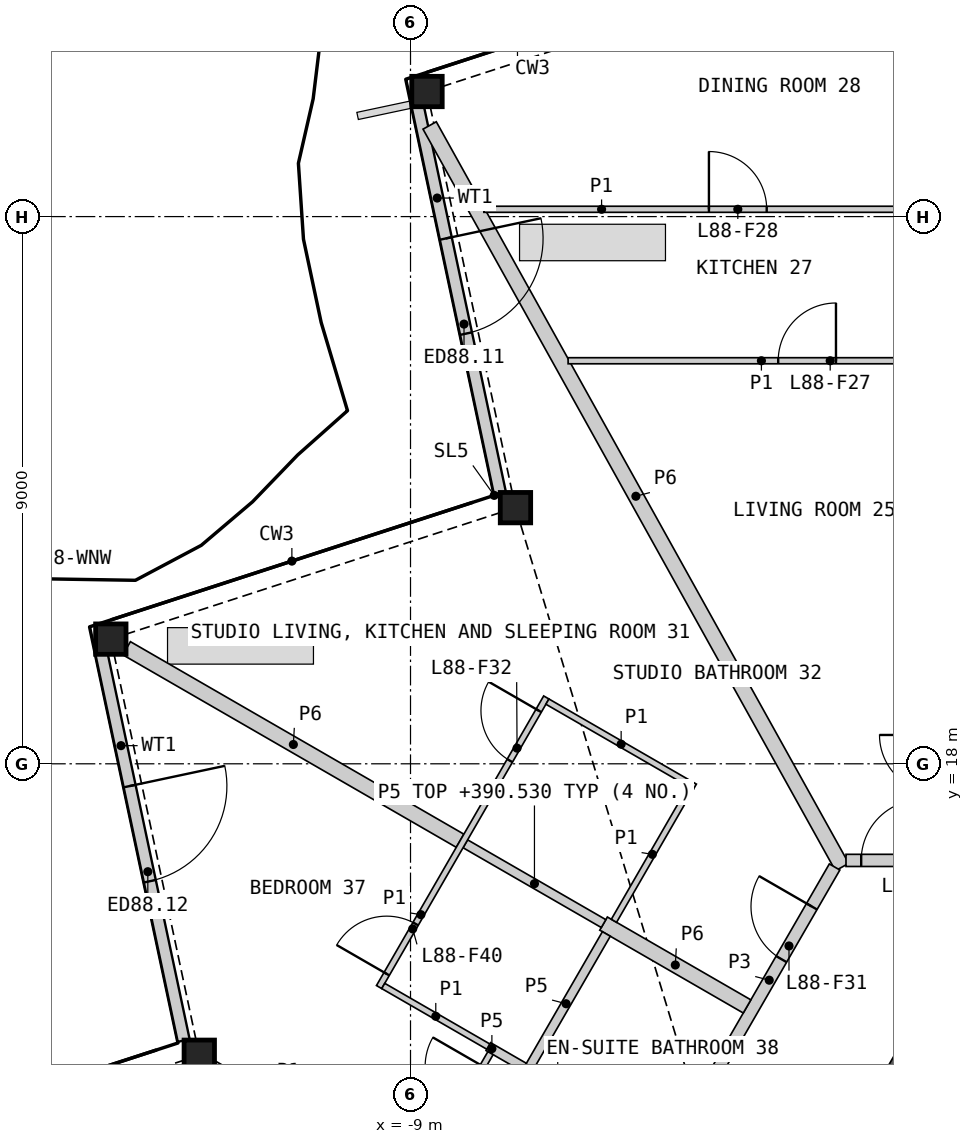
"""IFC4 building model, lengths in metres.
Left out: names, types, materials, properties, quantities, classifications, styles, units other than length and angle.
Written with IfcOpenShell. Run it as: python <this file> out.ifc"""

import sys

from ifc_helpers import new_model, si_unit, direction, frame, frame_2d, origin, origin_2d, place, context, subcontext, project, spatial, rectangle, hollow_rectangle, extrude, element, fill, save


model = new_model("IFC4")
c1 = context("Model", 3, precision=1e-05, world=origin(), true_north=direction((0.0, 1.0)))
c2 = subcontext(c1, "Body", "Model", "MODEL_VIEW")
j1 = project(units=[si_unit("LENGTHUNIT", "METRE"), si_unit("PLANEANGLEUNIT", "RADIAN")], contexts=[c1])
p1 = place(None, origin())
s1 = spatial("IfcSite", under=j1, at=p1, CompositionType="ELEMENT")
p2 = place(p1, origin())
s2 = spatial("IfcBuilding", under=s1, at=p2, CompositionType="ELEMENT")
p3 = place(p2, frame((0.0, 0.0, 388.2)))
s3 = spatial("IfcBuildingStorey", under=s2, at=p3, CompositionType="ELEMENT", Elevation=388.2)
for number, where, z_axis, x_axis in (
    (1, (-8.729, 29.057, 0.0), (0.0, 0.0, 1.0), (1.0, 0.0, 0.0)),
    (2, (-7.274, 22.213, 0.0), (0.0, 0.0, 1.0), (1.0, 0.0, 0.0)),
    (3, (-13.929, 20.051, 0.0), (0.0, 0.0, 1.0), (1.0, 0.0, 0.0)),
    (4, (-12.474, 13.206, 0.0), (0.0, 0.0, 1.0), (1.0, 0.0, 0.0)),
):
    element("IfcColumn", number, at=place(p3, frame(where, z_axis=z_axis, x_axis=x_axis)), inside=s3, PredefinedType="COLUMN", context=c2, shape_type="SweptSolid", body=[
        extrude(hollow_rectangle(XDim=0.5, YDim=0.5, WallThickness=0.03, at=origin_2d()), origin(), (0.0, 0.0, 1.0), 3.4),
    ])
p4 = place(p3, frame((-8.905, 28.922, 0.0), z_axis=(0.0, 0.0, 1.0), x_axis=(0.207917488951, -0.978146368285, 0.0)))
e5 = element("IfcWall", 5, at=p4, inside=s3, PredefinedType="SOLIDWALL", context=c2, shape_type="SweptSolid", body=[
    extrude(rectangle(XDim=6.612, YDim=0.2, at=frame_2d((3.306, 0.0))), origin(), (0.0, 0.0, 1.0), 2.634),
])
p5 = place(p4, frame((2.333, 0.0, 0.0)))
e6 = element("IfcOpeningElement", 6, at=p5, cuts=e5, PredefinedType="OPENING", context=c2, shape_type="SweptSolid", body=[
    extrude(rectangle(XDim=1.6, YDim=2.25, at=frame_2d((0.8, 1.125))), frame((0.0, 0.11, 0.0), z_axis=(0.0, -1.0, 0.0), x_axis=(1.0, 0.0, 0.0)), (0.0, 0.0, 1.0), 0.22),
])
p6 = place(p3, frame((-14.104, 19.915, 0.0), z_axis=(0.0, 0.0, 1.0), x_axis=(0.207924998532, -0.978144771997, 0.0)))
e7 = element("IfcWall", 7, at=p6, inside=s3, PredefinedType="SOLIDWALL", context=c2, shape_type="SweptSolid", body=[
    extrude(rectangle(XDim=6.612, YDim=0.2, at=frame_2d((3.306, 0.0))), origin(), (0.0, 0.0, 1.0), 2.634),
])
p7 = place(p6, frame((2.333, 0.0, 0.0)))
e8 = element("IfcOpeningElement", 8, at=p7, cuts=e7, PredefinedType="OPENING", context=c2, shape_type="SweptSolid", body=[
    extrude(rectangle(XDim=1.6, YDim=2.25, at=frame_2d((0.8, 1.125))), frame((0.0, 0.11, 0.0), z_axis=(0.0, -1.0, 0.0), x_axis=(1.0, 0.0, 0.0)), (0.0, 0.0, 1.0), 0.22),
])
p8 = place(p3, frame((-0.26, 13.961, 0.0), z_axis=(0.0, 0.0, 1.0), x_axis=(-0.499980485389, -0.866036670257, 0.0)))
e9 = element("IfcWall", 9, at=p8, inside=s3, PredefinedType="SHEAR", context=c2, shape_type="SweptSolid", body=[
    extrude(rectangle(XDim=4.559, YDim=0.6, at=frame_2d((2.28, 0.0))), origin(), (0.0, 0.0, 1.0), 3.1),
])
p9 = place(p3, frame((-8.685, 28.499, 0.0), z_axis=(0.0, 0.0, 1.0), x_axis=(0.486017177904, -0.873949256412, 0.0)))
e10 = element("IfcWall", 10, at=p9, inside=s3, PredefinedType="PARTITIONING", context=c2, shape_type="SweptSolid", body=[
    extrude(rectangle(XDim=13.956, YDim=0.25, at=frame_2d((6.978, 0.0))), origin(), (0.0, 0.0, 1.0), 2.33),
])
p10 = place(p3, frame((-13.669, 19.9, 0.0), z_axis=(0.0, 0.0, 1.0), x_axis=(0.866032778651, -0.499987226139, 0.0)))
e11 = element("IfcWall", 11, at=p10, inside=s3, PredefinedType="PARTITIONING", context=c2, shape_type="SweptSolid", body=[
    extrude(rectangle(XDim=6.332, YDim=0.25, at=frame_2d((3.166, 0.0))), origin(), (0.0, 0.0, 1.0), 2.33),
])
p11 = place(p3, frame((-4.176, 12.579, 0.0), z_axis=(0.0, 0.0, 1.0), x_axis=(0.500004215162, 0.866022970146, 0.0)))
e12 = element("IfcWall", 12, at=p11, inside=s3, PredefinedType="PARTITIONING", context=c2, shape_type="SweptSolid", body=[
    extrude(rectangle(XDim=4.3, YDim=0.2, at=frame_2d((2.15, 0.0))), origin(), (0.0, 0.0, 1.0), 3.1),
])
p12 = place(p11, frame((2.55, 0.0, 0.0)))
e13 = element("IfcOpeningElement", 13, at=p12, cuts=e12, PredefinedType="OPENING", context=c2, shape_type="SweptSolid", body=[
    extrude(rectangle(XDim=1.0, YDim=2.1, at=frame_2d((0.5, 1.05))), frame((0.0, 0.11, 0.0), z_axis=(0.0, -1.0, 0.0), x_axis=(1.0, 0.0, 0.0)), (0.0, 0.0, 1.0), 0.22),
])
p13 = place(p3, frame((-1.838, 16.411, 0.0), z_axis=(0.0, 0.0, 1.0), x_axis=(1.0, 0.0, 0.0)))
e14 = element("IfcWall", 14, at=p13, inside=s3, PredefinedType="PARTITIONING", context=c2, shape_type="SweptSolid", body=[
    extrude(rectangle(XDim=3.701, YDim=0.2, at=frame_2d((1.851, 0.0))), origin(), (0.0, 0.0, 1.0), 3.1),
])
p14 = place(p13, frame((0.25, 0.0, 0.0)))
e15 = element("IfcOpeningElement", 15, at=p14, cuts=e14, PredefinedType="OPENING", context=c2, shape_type="SweptSolid", body=[
    extrude(rectangle(XDim=1.0, YDim=2.1, at=frame_2d((0.5, 1.05))), frame((0.0, 0.11, 0.0), z_axis=(0.0, -1.0, 0.0), x_axis=(1.0, 0.0, 0.0)), (0.0, 0.0, 1.0), 0.22),
])
p15 = place(p3, frame((-5.825, 15.372, 0.0), z_axis=(0.0, 0.0, 1.0), x_axis=(0.866051307416, -0.49995513091, 0.0)))
e16 = element("IfcWall", 16, at=p15, inside=s3, PredefinedType="PARTITIONING", context=c2, shape_type="SweptSolid", body=[
    extrude(rectangle(XDim=2.725, YDim=0.25, at=frame_2d((1.362, 0.0))), origin(), (0.0, 0.0, 1.0), 2.33),
])
p16 = place(p3, frame((-8.098, 16.684, 0.0), z_axis=(0.0, 0.0, 1.0), x_axis=(0.866036909293, -0.499980071345, 0.0)))
e17 = element("IfcWall", 17, at=p16, inside=s3, PredefinedType="PLUMBINGWALL", context=c2, shape_type="SweptSolid", body=[
    extrude(rectangle(XDim=2.625, YDim=0.15, at=frame_2d((1.312, 0.0))), origin(), (0.0, 0.0, 1.0), 2.33),
])
p17 = place(p3, frame((-7.104, 12.906, 0.0), z_axis=(0.0, 0.0, 1.0), x_axis=(0.499993606316, 0.866029095148, 0.0)))
e18 = element("IfcWall", 18, at=p17, inside=s3, PredefinedType="PLUMBINGWALL", context=c2, shape_type="SweptSolid", body=[
    extrude(rectangle(XDim=2.65, YDim=0.15, at=frame_2d((1.325, 0.0))), origin(), (0.0, 0.0, 1.0), 2.33),
])
p18 = place(p3, frame((-7.72, 13.349, 0.0), z_axis=(0.0, 0.0, 1.0), x_axis=(0.866113839764, -0.499846793097, 0.0)))
e19 = element("IfcWall", 19, at=p18, inside=s3, PredefinedType="PLUMBINGWALL", context=c2, shape_type="SweptSolid", body=[
    extrude(rectangle(XDim=0.68, YDim=0.15, at=frame_2d((0.34, 0.0))), origin(), (0.0, 0.0, 1.0), 2.33),
])
p19 = place(p3, frame((-7.793, 27.12, 0.0), z_axis=(0.0, 0.0, 1.0), x_axis=(1.0, 0.0, 0.0)))
e20 = element("IfcWall", 20, at=p19, inside=s3, PredefinedType="PARTITIONING", context=c2, shape_type="SweptSolid", body=[
    extrude(rectangle(XDim=7.743, YDim=0.1, at=frame_2d((3.872, 0.0))), origin(), (0.0, 0.0, 1.0), 2.33),
])
p20 = place(p19, frame((3.701, 0.0, 0.0)))
e21 = element("IfcOpeningElement", 21, at=p20, cuts=e20, PredefinedType="OPENING", context=c2, shape_type="SweptSolid", body=[
    extrude(rectangle(XDim=0.95, YDim=2.1, at=frame_2d((0.475, 1.05))), frame((0.0, 0.06, 0.0), z_axis=(0.0, -1.0, 0.0), x_axis=(1.0, 0.0, 0.0)), (0.0, 0.0, 1.0), 0.12),
])
p21 = place(p3, frame((-6.408, 24.629, 0.0), z_axis=(0.0, 0.0, 1.0), x_axis=(1.0, 0.0, 0.0)))
e22 = element("IfcWall", 22, at=p21, inside=s3, PredefinedType="PARTITIONING", context=c2, shape_type="SweptSolid", body=[
    extrude(rectangle(XDim=6.358, YDim=0.1, at=frame_2d((3.179, 0.0))), origin(), (0.0, 0.0, 1.0), 2.33),
])
p22 = place(p21, frame((3.455, 0.0, 0.0)))
e23 = element("IfcOpeningElement", 23, at=p22, cuts=e22, PredefinedType="OPENING", context=c2, shape_type="SweptSolid", body=[
    extrude(rectangle(XDim=0.95, YDim=2.1, at=frame_2d((0.475, 1.05))), frame((0.0, 0.06, 0.0), z_axis=(0.0, -1.0, 0.0), x_axis=(1.0, 0.0, 0.0)), (0.0, 0.0, 1.0), 0.12),
])
p23 = place(p3, frame((-9.517, 14.328, 0.0), z_axis=(0.0, 0.0, 1.0), x_axis=(0.499996545922, 0.866027397988, 0.0)))
e24 = element("IfcWall", 24, at=p23, inside=s3, PredefinedType="PARTITIONING", context=c2, shape_type="SweptSolid", body=[
    extrude(rectangle(XDim=5.5, YDim=0.1, at=frame_2d((2.75, 0.0))), origin(), (0.0, 0.0, 1.0), 2.33),
])
p24 = place(p23, frame((4.3, 0.0, 0.0)))
e25 = element("IfcOpeningElement", 25, at=p24, cuts=e24, PredefinedType="OPENING", context=c2, shape_type="SweptSolid", body=[
    extrude(rectangle(XDim=0.95, YDim=2.1, at=frame_2d((0.475, 1.05))), frame((0.0, 0.06, 0.0), z_axis=(0.0, -1.0, 0.0), x_axis=(1.0, 0.0, 0.0)), (0.0, 0.0, 1.0), 0.12),
])
p25 = place(p23, frame((0.25, 0.0, 0.0)))
e26 = element("IfcOpeningElement", 26, at=p25, cuts=e24, PredefinedType="OPENING", context=c2, shape_type="SweptSolid", body=[
    extrude(rectangle(XDim=0.95, YDim=2.1, at=frame_2d((0.475, 1.05))), frame((0.0, 0.06, 0.0), z_axis=(0.0, -1.0, 0.0), x_axis=(1.0, 0.0, 0.0)), (0.0, 0.0, 1.0), 0.12),
])
p26 = place(p3, frame((-12.214, 13.056, 0.0), z_axis=(0.0, 0.0, 1.0), x_axis=(0.866017452598, -0.500013771606, 0.0)))
e27 = element("IfcWall", 27, at=p26, inside=s3, PredefinedType="PARTITIONING", context=c2, shape_type="SweptSolid", body=[
    extrude(rectangle(XDim=4.425, YDim=0.1, at=frame_2d((2.213, 0.0))), origin(), (0.0, 0.0, 1.0), 2.33),
])
p27 = place(p26, frame((1.994, 0.0, 0.0)))
e28 = element("IfcOpeningElement", 28, at=p27, cuts=e27, PredefinedType="OPENING", context=c2, shape_type="SweptSolid", body=[
    extrude(rectangle(XDim=0.95, YDim=2.1, at=frame_2d((0.475, 1.05))), frame((0.0, 0.06, 0.0), z_axis=(0.0, -1.0, 0.0), x_axis=(1.0, 0.0, 0.0)), (0.0, 0.0, 1.0), 0.12),
])
p28 = place(p3, frame((-6.748, 19.023, 0.0), z_axis=(0.0, 0.0, 1.0), x_axis=(0.866034573852, -0.49998411664, 0.0)))
e29 = element("IfcWall", 29, at=p28, inside=s3, PredefinedType="PARTITIONING", context=c2, shape_type="SweptSolid", body=[
    extrude(rectangle(XDim=2.8, YDim=0.1, at=frame_2d((1.4, 0.0))), origin(), (0.0, 0.0, 1.0), 2.33),
])
p29 = place(p3, frame((-5.654, 15.418, 0.0), z_axis=(0.0, 0.0, 1.0), x_axis=(0.500048846702, 0.865997200291, 0.0)))
e30 = element("IfcWall", 30, at=p29, inside=s3, PredefinedType="PARTITIONING", context=c2, shape_type="SweptSolid", body=[
    extrude(rectangle(XDim=2.525, YDim=0.1, at=frame_2d((1.263, 0.0))), origin(), (0.0, 0.0, 1.0), 2.33),
])
p30 = place(p3, frame((-8.872, 11.184, 0.0), z_axis=(0.0, 0.0, 1.0), x_axis=(0.499986429846, 0.866033238375, 0.0)))
e31 = element("IfcWall", 31, at=p30, inside=s3, PredefinedType="PARTITIONING", context=c2, shape_type="SweptSolid", body=[
    extrude(rectangle(XDim=2.375, YDim=0.1, at=frame_2d((1.188, 0.0))), origin(), (0.0, 0.0, 1.0), 2.33),
])
p31 = place(p30, frame((1.175, 0.0, 0.0)))
e32 = element("IfcOpeningElement", 32, at=p31, cuts=e31, PredefinedType="OPENING", context=c2, shape_type="SweptSolid", body=[
    extrude(rectangle(XDim=0.95, YDim=2.1, at=frame_2d((0.475, 1.05))), frame((0.0, 0.06, 0.0), z_axis=(0.0, -1.0, 0.0), x_axis=(1.0, 0.0, 0.0)), (0.0, 0.0, 1.0), 0.12),
])
p32 = place(p3, frame((-9.448, 14.346, 0.0), z_axis=(0.0, 0.0, 1.0), x_axis=(0.866020521143, -0.500008456887, 0.0)))
e33 = element("IfcWall", 33, at=p32, inside=s3, PredefinedType="PARTITIONING", context=c2, shape_type="SweptSolid", body=[
    extrude(rectangle(XDim=1.995, YDim=0.1, at=frame_2d((0.998, 0.0))), origin(), (0.0, 0.0, 1.0), 2.33),
])
p33 = place(p5, origin())
e34 = element("IfcDoor", 34, at=p33, inside=s3, OperationType="DOUBLE_DOOR_SINGLE_SWING", PredefinedType="DOOR", context=c2, shape_type="SweptSolid", body=[
    extrude(rectangle(XDim=1.6, YDim=2.25, at=frame_2d((0.8, 1.125))), frame((0.0, 0.025, 0.0), z_axis=(0.0, -1.0, 0.0), x_axis=(1.0, 0.0, 0.0)), (0.0, 0.0, 1.0), 0.05),
])
fill(e6, e34)
p34 = place(p7, origin())
e35 = element("IfcDoor", 35, at=p34, inside=s3, OperationType="DOUBLE_DOOR_SINGLE_SWING", PredefinedType="DOOR", context=c2, shape_type="SweptSolid", body=[
    extrude(rectangle(XDim=1.6, YDim=2.25, at=frame_2d((0.8, 1.125))), frame((0.0, 0.025, 0.0), z_axis=(0.0, -1.0, 0.0), x_axis=(1.0, 0.0, 0.0)), (0.0, 0.0, 1.0), 0.05),
])
fill(e8, e35)
p35 = place(p14, origin())
e36 = element("IfcDoor", 36, at=p35, inside=s3, OperationType="SINGLE_SWING_RIGHT", PredefinedType="DOOR", context=c2, shape_type="SweptSolid", body=[
    extrude(rectangle(XDim=1.0, YDim=2.1, at=frame_2d((0.5, 1.05))), frame((0.0, 0.025, 0.0), z_axis=(0.0, -1.0, 0.0), x_axis=(1.0, 0.0, 0.0)), (0.0, 0.0, 1.0), 0.05),
])
fill(e15, e36)
p36 = place(p22, origin())
e37 = element("IfcDoor", 37, at=p36, inside=s3, OperationType="SINGLE_SWING_RIGHT", PredefinedType="DOOR", context=c2, shape_type="SweptSolid", body=[
    extrude(rectangle(XDim=0.95, YDim=2.1, at=frame_2d((0.475, 1.05))), frame((0.0, 0.025, 0.0), z_axis=(0.0, -1.0, 0.0), x_axis=(1.0, 0.0, 0.0)), (0.0, 0.0, 1.0), 0.05),
])
fill(e23, e37)
p37 = place(p20, origin())
e38 = element("IfcDoor", 38, at=p37, inside=s3, OperationType="SINGLE_SWING_LEFT", PredefinedType="DOOR", context=c2, shape_type="SweptSolid", body=[
    extrude(rectangle(XDim=0.95, YDim=2.1, at=frame_2d((0.475, 1.05))), frame((0.0, 0.025, 0.0), z_axis=(0.0, -1.0, 0.0), x_axis=(1.0, 0.0, 0.0)), (0.0, 0.0, 1.0), 0.05),
])
fill(e21, e38)
p38 = place(p12, origin())
e39 = element("IfcDoor", 39, at=p38, inside=s3, OperationType="SINGLE_SWING_RIGHT", PredefinedType="DOOR", context=c2, shape_type="SweptSolid", body=[
    extrude(rectangle(XDim=1.0, YDim=2.1, at=frame_2d((0.5, 1.05))), frame((0.0, 0.025, 0.0), z_axis=(0.0, -1.0, 0.0), x_axis=(1.0, 0.0, 0.0)), (0.0, 0.0, 1.0), 0.05),
])
fill(e13, e39)
p39 = place(p24, origin())
e40 = element("IfcDoor", 40, at=p39, inside=s3, OperationType="SINGLE_SWING_RIGHT", PredefinedType="DOOR", context=c2, shape_type="SweptSolid", body=[
    extrude(rectangle(XDim=0.95, YDim=2.1, at=frame_2d((0.475, 1.05))), frame((0.0, 0.025, 0.0), z_axis=(0.0, -1.0, 0.0), x_axis=(1.0, 0.0, 0.0)), (0.0, 0.0, 1.0), 0.05),
])
fill(e25, e40)
p40 = place(p25, origin())
e41 = element("IfcDoor", 41, at=p40, inside=s3, OperationType="SINGLE_SWING_LEFT", PredefinedType="DOOR", context=c2, shape_type="SweptSolid", body=[
    extrude(rectangle(XDim=0.95, YDim=2.1, at=frame_2d((0.475, 1.05))), frame((0.0, 0.025, 0.0), z_axis=(0.0, -1.0, 0.0), x_axis=(1.0, 0.0, 0.0)), (0.0, 0.0, 1.0), 0.05),
])
fill(e26, e41)
save(model, sys.argv[1])
